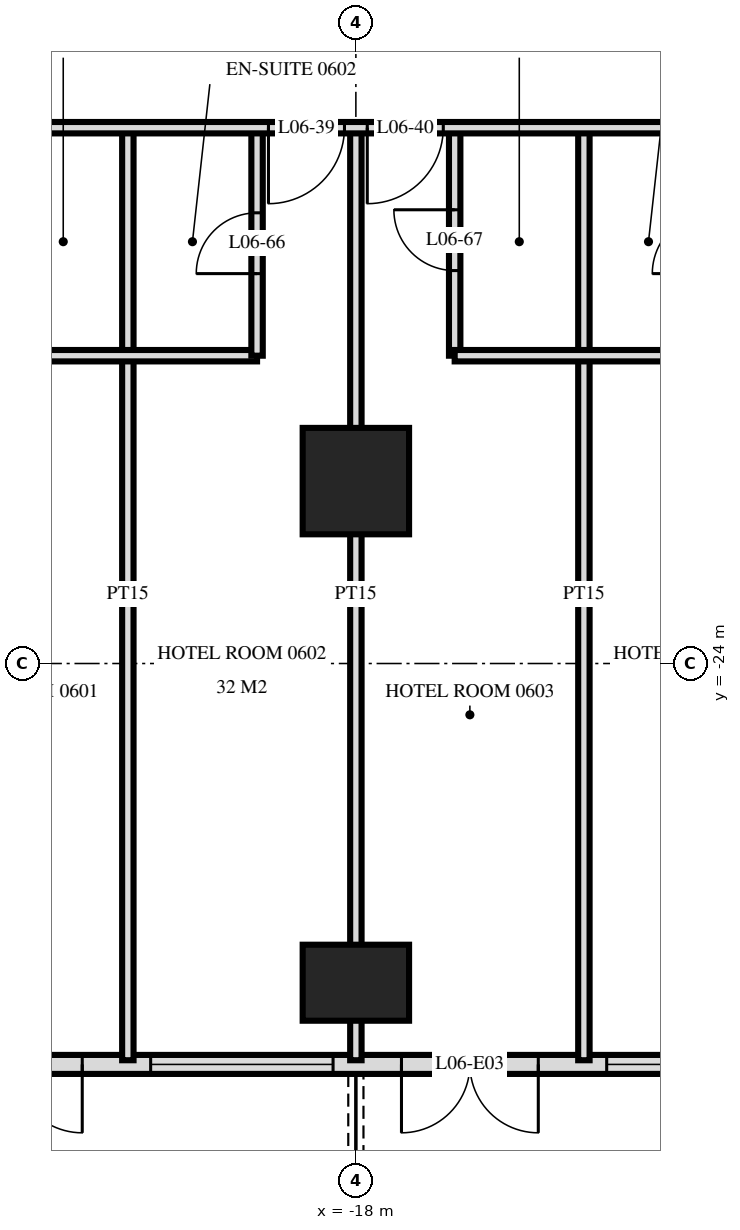
"""IFC4 building model, lengths in metres.
Left out: names, types, materials, properties, quantities, classifications, styles, units other than length and angle.
Written with IfcOpenShell. Run it as: python <this file> out.ifc"""

import sys

from ifc_helpers import new_model, si_unit, direction, frame, frame_2d, origin, origin_2d, place, context, subcontext, project, spatial, rectangle, extrude, element, fill, save


model = new_model("IFC4")
c1 = context("Model", 3, precision=1e-05, world=origin(), true_north=direction((0.0, 1.0)))
c2 = subcontext(c1, "Body", "Model", "MODEL_VIEW")
j1 = project(units=[si_unit("LENGTHUNIT", "METRE"), si_unit("PLANEANGLEUNIT", "RADIAN")], contexts=[c1])
p1 = place(None, origin())
s1 = spatial("IfcSite", under=j1, at=p1, CompositionType="ELEMENT")
p2 = place(p1, origin())
s2 = spatial("IfcBuilding", under=s1, at=p2, CompositionType="ELEMENT")
p3 = place(p2, frame((0.0, 0.0, 31.2)))
s3 = spatial("IfcBuildingStorey", under=s2, at=p3, CompositionType="ELEMENT", Elevation=31.2)
p4 = place(p3, frame((-18.0, -28.2, 0.0), z_axis=(0.0, 0.0, 1.0), x_axis=(1.0, 0.0, 0.0)))
e1 = element("IfcColumn", 1, at=p4, inside=s3, PredefinedType="COLUMN", context=c2, shape_type="SweptSolid", body=[
    extrude(rectangle(XDim=1.4, YDim=1.0, at=origin_2d()), origin(), (0.0, 0.0, 1.0), 3.6),
])
p5 = place(p3, frame((-18.0, -21.6, 0.0), z_axis=(0.0, 0.0, 1.0), x_axis=(1.0, 0.0, 0.0)))
e2 = element("IfcColumn", 2, at=p5, inside=s3, PredefinedType="COLUMN", context=c2, shape_type="SweptSolid", body=[
    extrude(rectangle(XDim=1.4, YDim=1.4, at=origin_2d()), origin(), (0.0, 0.0, 1.0), 3.6),
])
p6 = place(p3, frame((-28.775, -29.275, 0.0), z_axis=(0.0, 0.0, 1.0), x_axis=(1.0, 0.0, 0.0)))
e3 = element("IfcWall", 3, at=p6, inside=s3, PredefinedType="SOLIDWALL", context=c2, shape_type="SweptSolid", body=[
    extrude(rectangle(XDim=57.551, YDim=0.25, at=frame_2d((28.775, 0.0))), origin(), (0.0, 0.0, 1.0), 3.32),
])
p7 = place(p6, frame((0.575, 0.0, 0.0)))
e4 = element("IfcOpeningElement", 4, at=p7, cuts=e3, PredefinedType="OPENING", context=c2, shape_type="SweptSolid", body=[
    extrude(rectangle(XDim=1.8, YDim=2.4, at=frame_2d((0.9, 1.2))), frame((0.0, 0.135, 0.0), z_axis=(0.0, -1.0, 0.0), x_axis=(1.0, 0.0, 0.0)), (0.0, 0.0, 1.0), 0.27),
])
p8 = place(p6, frame((5.375, 0.0, 0.0)))
e5 = element("IfcOpeningElement", 5, at=p8, cuts=e3, PredefinedType="OPENING", context=c2, shape_type="SweptSolid", body=[
    extrude(rectangle(XDim=1.8, YDim=2.4, at=frame_2d((0.9, 1.2))), frame((0.0, 0.135, 0.0), z_axis=(0.0, -1.0, 0.0), x_axis=(1.0, 0.0, 0.0)), (0.0, 0.0, 1.0), 0.27),
])
p9 = place(p6, frame((8.075, 0.0, 0.3)))
e6 = element("IfcOpeningElement", 6, at=p9, cuts=e3, PredefinedType="OPENING", context=c2, shape_type="SweptSolid", body=[
    extrude(rectangle(XDim=2.4, YDim=2.1, at=frame_2d((1.2, 1.05))), frame((0.0, 0.135, 0.0), z_axis=(0.0, -1.0, 0.0), x_axis=(1.0, 0.0, 0.0)), (0.0, 0.0, 1.0), 0.27),
])
p10 = place(p6, frame((11.375, 0.0, 0.0)))
e7 = element("IfcOpeningElement", 7, at=p10, cuts=e3, PredefinedType="OPENING", context=c2, shape_type="SweptSolid", body=[
    extrude(rectangle(XDim=1.8, YDim=2.4, at=frame_2d((0.9, 1.2))), frame((0.0, 0.135, 0.0), z_axis=(0.0, -1.0, 0.0), x_axis=(1.0, 0.0, 0.0)), (0.0, 0.0, 1.0), 0.27),
])
p11 = place(p6, frame((14.075, 0.0, 0.3)))
e8 = element("IfcOpeningElement", 8, at=p11, cuts=e3, PredefinedType="OPENING", context=c2, shape_type="SweptSolid", body=[
    extrude(rectangle(XDim=2.4, YDim=2.1, at=frame_2d((1.2, 1.05))), frame((0.0, 0.135, 0.0), z_axis=(0.0, -1.0, 0.0), x_axis=(1.0, 0.0, 0.0)), (0.0, 0.0, 1.0), 0.27),
])
p12 = place(p6, frame((17.375, 0.0, 0.0)))
e9 = element("IfcOpeningElement", 9, at=p12, cuts=e3, PredefinedType="OPENING", context=c2, shape_type="SweptSolid", body=[
    extrude(rectangle(XDim=1.8, YDim=2.4, at=frame_2d((0.9, 1.2))), frame((0.0, 0.135, 0.0), z_axis=(0.0, -1.0, 0.0), x_axis=(1.0, 0.0, 0.0)), (0.0, 0.0, 1.0), 0.27),
])
p13 = place(p6, frame((20.075, 0.0, 0.3)))
e10 = element("IfcOpeningElement", 10, at=p13, cuts=e3, PredefinedType="OPENING", context=c2, shape_type="SweptSolid", body=[
    extrude(rectangle(XDim=2.4, YDim=2.1, at=frame_2d((1.2, 1.05))), frame((0.0, 0.135, 0.0), z_axis=(0.0, -1.0, 0.0), x_axis=(1.0, 0.0, 0.0)), (0.0, 0.0, 1.0), 0.27),
])
p14 = place(p6, frame((23.075, 0.0, 0.3)))
e11 = element("IfcOpeningElement", 11, at=p14, cuts=e3, PredefinedType="OPENING", context=c2, shape_type="SweptSolid", body=[
    extrude(rectangle(XDim=2.4, YDim=2.1, at=frame_2d((1.2, 1.05))), frame((0.0, 0.135, 0.0), z_axis=(0.0, -1.0, 0.0), x_axis=(1.0, 0.0, 0.0)), (0.0, 0.0, 1.0), 0.27),
])
p15 = place(p6, frame((26.375, 0.0, 0.0)))
e12 = element("IfcOpeningElement", 12, at=p15, cuts=e3, PredefinedType="OPENING", context=c2, shape_type="SweptSolid", body=[
    extrude(rectangle(XDim=1.8, YDim=2.4, at=frame_2d((0.9, 1.2))), frame((0.0, 0.135, 0.0), z_axis=(0.0, -1.0, 0.0), x_axis=(1.0, 0.0, 0.0)), (0.0, 0.0, 1.0), 0.27),
])
p16 = place(p6, frame((29.375, 0.0, 0.0)))
e13 = element("IfcOpeningElement", 13, at=p16, cuts=e3, PredefinedType="OPENING", context=c2, shape_type="SweptSolid", body=[
    extrude(rectangle(XDim=1.8, YDim=2.4, at=frame_2d((0.9, 1.2))), frame((0.0, 0.135, 0.0), z_axis=(0.0, -1.0, 0.0), x_axis=(1.0, 0.0, 0.0)), (0.0, 0.0, 1.0), 0.27),
])
p17 = place(p6, frame((32.075, 0.0, 0.3)))
e14 = element("IfcOpeningElement", 14, at=p17, cuts=e3, PredefinedType="OPENING", context=c2, shape_type="SweptSolid", body=[
    extrude(rectangle(XDim=2.4, YDim=2.1, at=frame_2d((1.2, 1.05))), frame((0.0, 0.135, 0.0), z_axis=(0.0, -1.0, 0.0), x_axis=(1.0, 0.0, 0.0)), (0.0, 0.0, 1.0), 0.27),
])
p18 = place(p6, frame((35.375, 0.0, 0.0)))
e15 = element("IfcOpeningElement", 15, at=p18, cuts=e3, PredefinedType="OPENING", context=c2, shape_type="SweptSolid", body=[
    extrude(rectangle(XDim=1.8, YDim=2.4, at=frame_2d((0.9, 1.2))), frame((0.0, 0.135, 0.0), z_axis=(0.0, -1.0, 0.0), x_axis=(1.0, 0.0, 0.0)), (0.0, 0.0, 1.0), 0.27),
])
p19 = place(p6, frame((38.075, 0.0, 0.3)))
e16 = element("IfcOpeningElement", 16, at=p19, cuts=e3, PredefinedType="OPENING", context=c2, shape_type="SweptSolid", body=[
    extrude(rectangle(XDim=2.4, YDim=2.1, at=frame_2d((1.2, 1.05))), frame((0.0, 0.135, 0.0), z_axis=(0.0, -1.0, 0.0), x_axis=(1.0, 0.0, 0.0)), (0.0, 0.0, 1.0), 0.27),
])
p20 = place(p6, frame((41.375, 0.0, 0.0)))
e17 = element("IfcOpeningElement", 17, at=p20, cuts=e3, PredefinedType="OPENING", context=c2, shape_type="SweptSolid", body=[
    extrude(rectangle(XDim=1.8, YDim=2.4, at=frame_2d((0.9, 1.2))), frame((0.0, 0.135, 0.0), z_axis=(0.0, -1.0, 0.0), x_axis=(1.0, 0.0, 0.0)), (0.0, 0.0, 1.0), 0.27),
])
p21 = place(p6, frame((44.075, 0.0, 0.3)))
e18 = element("IfcOpeningElement", 18, at=p21, cuts=e3, PredefinedType="OPENING", context=c2, shape_type="SweptSolid", body=[
    extrude(rectangle(XDim=2.4, YDim=2.1, at=frame_2d((1.2, 1.05))), frame((0.0, 0.135, 0.0), z_axis=(0.0, -1.0, 0.0), x_axis=(1.0, 0.0, 0.0)), (0.0, 0.0, 1.0), 0.27),
])
p22 = place(p6, frame((47.075, 0.0, 0.3)))
e19 = element("IfcOpeningElement", 19, at=p22, cuts=e3, PredefinedType="OPENING", context=c2, shape_type="SweptSolid", body=[
    extrude(rectangle(XDim=2.4, YDim=2.1, at=frame_2d((1.2, 1.05))), frame((0.0, 0.135, 0.0), z_axis=(0.0, -1.0, 0.0), x_axis=(1.0, 0.0, 0.0)), (0.0, 0.0, 1.0), 0.27),
])
p23 = place(p6, frame((50.375, 0.0, 0.0)))
e20 = element("IfcOpeningElement", 20, at=p23, cuts=e3, PredefinedType="OPENING", context=c2, shape_type="SweptSolid", body=[
    extrude(rectangle(XDim=1.8, YDim=2.4, at=frame_2d((0.9, 1.2))), frame((0.0, 0.135, 0.0), z_axis=(0.0, -1.0, 0.0), x_axis=(1.0, 0.0, 0.0)), (0.0, 0.0, 1.0), 0.27),
])
p24 = place(p6, frame((53.375, 0.0, 0.0)))
e21 = element("IfcOpeningElement", 21, at=p24, cuts=e3, PredefinedType="OPENING", context=c2, shape_type="SweptSolid", body=[
    extrude(rectangle(XDim=1.8, YDim=2.4, at=frame_2d((0.9, 1.2))), frame((0.0, 0.135, 0.0), z_axis=(0.0, -1.0, 0.0), x_axis=(1.0, 0.0, 0.0)), (0.0, 0.0, 1.0), 0.27),
])
p25 = place(p3, frame((-15.0, -29.22, 0.0), z_axis=(0.0, 0.0, 1.0), x_axis=(0.0, 1.0, 0.0)))
e22 = element("IfcWall", 22, at=p25, inside=s3, PredefinedType="PARTITIONING", context=c2, shape_type="SweptSolid", body=[
    extrude(rectangle(XDim=12.27, YDim=0.15, at=frame_2d((6.135, 0.0))), origin(), (0.0, 0.0, 1.0), 3.32),
])
p26 = place(p3, frame((-16.7, -19.95, 0.0), z_axis=(0.0, 0.0, 1.0), x_axis=(0.0, 1.0, 0.0)))
e23 = element("IfcWall", 23, at=p26, inside=s3, PredefinedType="PARTITIONING", context=c2, shape_type="SweptSolid", body=[
    extrude(rectangle(XDim=3.0, YDim=0.15, at=frame_2d((1.5, 0.0))), origin(), (0.0, 0.0, 1.0), 3.32),
])
p27 = place(p26, frame((1.12, 0.0, 0.0)))
e24 = element("IfcOpeningElement", 24, at=p27, cuts=e23, PredefinedType="OPENING", context=c2, shape_type="SweptSolid", body=[
    extrude(rectangle(XDim=0.8, YDim=2.1, at=frame_2d((0.4, 1.05))), frame((0.0, 0.085, 0.0), z_axis=(0.0, -1.0, 0.0), x_axis=(1.0, 0.0, 0.0)), (0.0, 0.0, 1.0), 0.17),
])
p28 = place(p3, frame((-18.0, -29.22, 0.0), z_axis=(0.0, 0.0, 1.0), x_axis=(0.0, 1.0, 0.0)))
e25 = element("IfcWall", 25, at=p28, inside=s3, PredefinedType="PARTITIONING", context=c2, shape_type="SweptSolid", body=[
    extrude(rectangle(XDim=12.27, YDim=0.15, at=frame_2d((6.135, 0.0))), origin(), (0.0, 0.0, 1.0), 3.32),
])
p29 = place(p3, frame((-19.3, -19.95, 0.0), z_axis=(0.0, 0.0, 1.0), x_axis=(0.0, 1.0, 0.0)))
e26 = element("IfcWall", 26, at=p29, inside=s3, PredefinedType="PARTITIONING", context=c2, shape_type="SweptSolid", body=[
    extrude(rectangle(XDim=3.0, YDim=0.15, at=frame_2d((1.5, 0.0))), origin(), (0.0, 0.0, 1.0), 3.32),
])
p30 = place(p29, frame((1.08, 0.0, 0.0)))
e27 = element("IfcOpeningElement", 27, at=p30, cuts=e26, PredefinedType="OPENING", context=c2, shape_type="SweptSolid", body=[
    extrude(rectangle(XDim=0.8, YDim=2.1, at=frame_2d((0.4, 1.05))), frame((0.0, 0.085, 0.0), z_axis=(0.0, -1.0, 0.0), x_axis=(1.0, 0.0, 0.0)), (0.0, 0.0, 1.0), 0.17),
])
p31 = place(p3, frame((-21.0, -29.22, 0.0), z_axis=(0.0, 0.0, 1.0), x_axis=(0.0, 1.0, 0.0)))
e28 = element("IfcWall", 28, at=p31, inside=s3, PredefinedType="PARTITIONING", context=c2, shape_type="SweptSolid", body=[
    extrude(rectangle(XDim=12.27, YDim=0.15, at=frame_2d((6.135, 0.0))), origin(), (0.0, 0.0, 1.0), 3.32),
])
for number, where, z_axis, x_axis in (
    (29, (-22.7, -19.95, 0.0), (0.0, 0.0, 1.0), (1.0, 0.0, 0.0)),
    (30, (-16.7, -19.95, 0.0), (0.0, 0.0, 1.0), (1.0, 0.0, 0.0)),
):
    element("IfcWall", number, at=place(p3, frame(where, z_axis=z_axis, x_axis=x_axis)), inside=s3, PredefinedType="PARTITIONING", context=c2, shape_type="SweptSolid", body=[
        extrude(rectangle(XDim=3.4, YDim=0.15, at=frame_2d((1.7, 0.0))), origin(), (0.0, 0.0, 1.0), 3.32),
    ])
p32 = place(p3, frame((-33.12, -16.95, 0.0), z_axis=(0.0, 0.0, 1.0), x_axis=(1.0, 0.0, 0.0)))
e31 = element("IfcWall", 31, at=p32, inside=s3, PredefinedType="PARTITIONING", context=c2, shape_type="SweptSolid", body=[
    extrude(rectangle(XDim=66.24, YDim=0.15, at=frame_2d((33.12, 0.0))), origin(), (0.0, 0.0, 1.0), 3.32),
])
p33 = place(p32, frame((9.27, 0.0, 0.0)))
e32 = element("IfcOpeningElement", 32, at=p33, cuts=e31, PredefinedType="OPENING", context=c2, shape_type="SweptSolid", body=[
    extrude(rectangle(XDim=1.0, YDim=2.1, at=frame_2d((0.5, 1.05))), frame((0.0, 0.085, 0.0), z_axis=(0.0, -1.0, 0.0), x_axis=(1.0, 0.0, 0.0)), (0.0, 0.0, 1.0), 0.17),
])
p34 = place(p32, frame((13.97, 0.0, 0.0)))
e33 = element("IfcOpeningElement", 33, at=p34, cuts=e31, PredefinedType="OPENING", context=c2, shape_type="SweptSolid", body=[
    extrude(rectangle(XDim=1.0, YDim=2.1, at=frame_2d((0.5, 1.05))), frame((0.0, 0.085, 0.0), z_axis=(0.0, -1.0, 0.0), x_axis=(1.0, 0.0, 0.0)), (0.0, 0.0, 1.0), 0.17),
])
p35 = place(p32, frame((15.27, 0.0, 0.0)))
e34 = element("IfcOpeningElement", 34, at=p35, cuts=e31, PredefinedType="OPENING", context=c2, shape_type="SweptSolid", body=[
    extrude(rectangle(XDim=1.0, YDim=2.1, at=frame_2d((0.5, 1.05))), frame((0.0, 0.085, 0.0), z_axis=(0.0, -1.0, 0.0), x_axis=(1.0, 0.0, 0.0)), (0.0, 0.0, 1.0), 0.17),
])
p36 = place(p32, frame((19.97, 0.0, 0.0)))
e35 = element("IfcOpeningElement", 35, at=p36, cuts=e31, PredefinedType="OPENING", context=c2, shape_type="SweptSolid", body=[
    extrude(rectangle(XDim=1.0, YDim=2.1, at=frame_2d((0.5, 1.05))), frame((0.0, 0.085, 0.0), z_axis=(0.0, -1.0, 0.0), x_axis=(1.0, 0.0, 0.0)), (0.0, 0.0, 1.0), 0.17),
])
p37 = place(p32, frame((22.27, 0.0, 0.0)))
e36 = element("IfcOpeningElement", 36, at=p37, cuts=e31, PredefinedType="OPENING", context=c2, shape_type="SweptSolid", body=[
    extrude(rectangle(XDim=1.0, YDim=2.1, at=frame_2d((0.5, 1.05))), frame((0.0, 0.085, 0.0), z_axis=(0.0, -1.0, 0.0), x_axis=(1.0, 0.0, 0.0)), (0.0, 0.0, 1.0), 0.17),
])
p38 = place(p32, frame((28.97, 0.0, 0.0)))
e37 = element("IfcOpeningElement", 37, at=p38, cuts=e31, PredefinedType="OPENING", context=c2, shape_type="SweptSolid", body=[
    extrude(rectangle(XDim=1.0, YDim=2.1, at=frame_2d((0.5, 1.05))), frame((0.0, 0.085, 0.0), z_axis=(0.0, -1.0, 0.0), x_axis=(1.0, 0.0, 0.0)), (0.0, 0.0, 1.0), 0.17),
])
p39 = place(p32, frame((30.27, 0.0, 0.0)))
e38 = element("IfcOpeningElement", 38, at=p39, cuts=e31, PredefinedType="OPENING", context=c2, shape_type="SweptSolid", body=[
    extrude(rectangle(XDim=1.0, YDim=2.1, at=frame_2d((0.5, 1.05))), frame((0.0, 0.085, 0.0), z_axis=(0.0, -1.0, 0.0), x_axis=(1.0, 0.0, 0.0)), (0.0, 0.0, 1.0), 0.17),
])
p40 = place(p32, frame((34.97, 0.0, 0.0)))
e39 = element("IfcOpeningElement", 39, at=p40, cuts=e31, PredefinedType="OPENING", context=c2, shape_type="SweptSolid", body=[
    extrude(rectangle(XDim=1.0, YDim=2.1, at=frame_2d((0.5, 1.05))), frame((0.0, 0.085, 0.0), z_axis=(0.0, -1.0, 0.0), x_axis=(1.0, 0.0, 0.0)), (0.0, 0.0, 1.0), 0.17),
])
p41 = place(p32, frame((36.27, 0.0, 0.0)))
e40 = element("IfcOpeningElement", 40, at=p41, cuts=e31, PredefinedType="OPENING", context=c2, shape_type="SweptSolid", body=[
    extrude(rectangle(XDim=1.0, YDim=2.1, at=frame_2d((0.5, 1.05))), frame((0.0, 0.085, 0.0), z_axis=(0.0, -1.0, 0.0), x_axis=(1.0, 0.0, 0.0)), (0.0, 0.0, 1.0), 0.17),
])
p42 = place(p32, frame((40.97, 0.0, 0.0)))
e41 = element("IfcOpeningElement", 41, at=p42, cuts=e31, PredefinedType="OPENING", context=c2, shape_type="SweptSolid", body=[
    extrude(rectangle(XDim=1.0, YDim=2.1, at=frame_2d((0.5, 1.05))), frame((0.0, 0.085, 0.0), z_axis=(0.0, -1.0, 0.0), x_axis=(1.0, 0.0, 0.0)), (0.0, 0.0, 1.0), 0.17),
])
p43 = place(p32, frame((42.27, 0.0, 0.0)))
e42 = element("IfcOpeningElement", 42, at=p43, cuts=e31, PredefinedType="OPENING", context=c2, shape_type="SweptSolid", body=[
    extrude(rectangle(XDim=1.0, YDim=2.1, at=frame_2d((0.5, 1.05))), frame((0.0, 0.085, 0.0), z_axis=(0.0, -1.0, 0.0), x_axis=(1.0, 0.0, 0.0)), (0.0, 0.0, 1.0), 0.17),
])
p44 = place(p32, frame((46.97, 0.0, 0.0)))
e43 = element("IfcOpeningElement", 43, at=p44, cuts=e31, PredefinedType="OPENING", context=c2, shape_type="SweptSolid", body=[
    extrude(rectangle(XDim=1.0, YDim=2.1, at=frame_2d((0.5, 1.05))), frame((0.0, 0.085, 0.0), z_axis=(0.0, -1.0, 0.0), x_axis=(1.0, 0.0, 0.0)), (0.0, 0.0, 1.0), 0.17),
])
p45 = place(p32, frame((48.27, 0.0, 0.0)))
e44 = element("IfcOpeningElement", 44, at=p45, cuts=e31, PredefinedType="OPENING", context=c2, shape_type="SweptSolid", body=[
    extrude(rectangle(XDim=1.0, YDim=2.1, at=frame_2d((0.5, 1.05))), frame((0.0, 0.085, 0.0), z_axis=(0.0, -1.0, 0.0), x_axis=(1.0, 0.0, 0.0)), (0.0, 0.0, 1.0), 0.17),
])
p46 = place(p32, frame((52.97, 0.0, 0.0)))
e45 = element("IfcOpeningElement", 45, at=p46, cuts=e31, PredefinedType="OPENING", context=c2, shape_type="SweptSolid", body=[
    extrude(rectangle(XDim=1.0, YDim=2.1, at=frame_2d((0.5, 1.05))), frame((0.0, 0.085, 0.0), z_axis=(0.0, -1.0, 0.0), x_axis=(1.0, 0.0, 0.0)), (0.0, 0.0, 1.0), 0.17),
])
p47 = place(p32, frame((54.27, 0.0, 0.0)))
e46 = element("IfcOpeningElement", 46, at=p47, cuts=e31, PredefinedType="OPENING", context=c2, shape_type="SweptSolid", body=[
    extrude(rectangle(XDim=1.0, YDim=2.1, at=frame_2d((0.5, 1.05))), frame((0.0, 0.085, 0.0), z_axis=(0.0, -1.0, 0.0), x_axis=(1.0, 0.0, 0.0)), (0.0, 0.0, 1.0), 0.17),
])
p48 = place(p32, frame((4.4, 0.0, 0.0)))
e47 = element("IfcOpeningElement", 47, at=p48, cuts=e31, PredefinedType="OPENING", context=c2, shape_type="SweptSolid", body=[
    extrude(rectangle(XDim=1.0, YDim=2.1, at=frame_2d((0.5, 1.05))), frame((0.0, 0.085, 0.0), z_axis=(0.0, -1.0, 0.0), x_axis=(1.0, 0.0, 0.0)), (0.0, 0.0, 1.0), 0.17),
])
p49 = place(p32, frame((60.8, 0.0, 0.0)))
e48 = element("IfcOpeningElement", 48, at=p49, cuts=e31, PredefinedType="OPENING", context=c2, shape_type="SweptSolid", body=[
    extrude(rectangle(XDim=1.0, YDim=2.1, at=frame_2d((0.5, 1.05))), frame((0.0, 0.085, 0.0), z_axis=(0.0, -1.0, 0.0), x_axis=(1.0, 0.0, 0.0)), (0.0, 0.0, 1.0), 0.17),
])
p50 = place(p8, frame((0.9, 0.0, 0.0), z_axis=(0.0, 0.0, 1.0), x_axis=(-1.0, 0.0, 0.0)))
e49 = element("IfcDoor", 49, at=p50, inside=s3, OperationType="DOUBLE_DOOR_SINGLE_SWING", PredefinedType="DOOR", context=c2, shape_type="SweptSolid", body=[
    extrude(rectangle(XDim=1.8, YDim=2.4, at=frame_2d((0.0, 1.2))), frame((0.0, -0.025, 0.0), z_axis=(0.0, 1.0, 0.0), x_axis=(-1.0, 0.0, 0.0)), (0.0, 0.0, 1.0), 0.05),
])
fill(e5, e49)
p51 = place(p9, origin())
e50 = element("IfcWindow", 50, at=p51, inside=s3, PartitioningType="SINGLE_PANEL", PredefinedType="WINDOW", context=c2, shape_type="SweptSolid", body=[
    extrude(rectangle(XDim=2.4, YDim=2.1, at=frame_2d((1.2, 1.05))), frame((0.0, 0.03, 0.0), z_axis=(0.0, -1.0, 0.0), x_axis=(1.0, 0.0, 0.0)), (0.0, 0.0, 1.0), 0.06),
])
fill(e6, e50)
p52 = place(p10, frame((0.9, 0.0, 0.0), z_axis=(0.0, 0.0, 1.0), x_axis=(-1.0, 0.0, 0.0)))
e51 = element("IfcDoor", 51, at=p52, inside=s3, OperationType="DOUBLE_DOOR_SINGLE_SWING", PredefinedType="DOOR", context=c2, shape_type="SweptSolid", body=[
    extrude(rectangle(XDim=1.8, YDim=2.4, at=frame_2d((0.0, 1.2))), frame((0.0, -0.025, 0.0), z_axis=(0.0, 1.0, 0.0), x_axis=(-1.0, 0.0, 0.0)), (0.0, 0.0, 1.0), 0.05),
])
fill(e7, e51)
p53 = place(p11, origin())
e52 = element("IfcWindow", 52, at=p53, inside=s3, PartitioningType="SINGLE_PANEL", PredefinedType="WINDOW", context=c2, shape_type="SweptSolid", body=[
    extrude(rectangle(XDim=2.4, YDim=2.1, at=frame_2d((1.2, 1.05))), frame((0.0, 0.03, 0.0), z_axis=(0.0, -1.0, 0.0), x_axis=(1.0, 0.0, 0.0)), (0.0, 0.0, 1.0), 0.06),
])
fill(e8, e52)
p54 = place(p34, frame((0.5, 0.0, 0.0), z_axis=(0.0, 0.0, 1.0), x_axis=(-1.0, 0.0, 0.0)))
e53 = element("IfcDoor", 53, at=p54, inside=s3, OperationType="SINGLE_SWING_LEFT", PredefinedType="DOOR", context=c2, shape_type="SweptSolid", body=[
    extrude(rectangle(XDim=1.0, YDim=2.1, at=frame_2d((0.0, 1.05))), frame((0.0, -0.025, 0.0), z_axis=(0.0, 1.0, 0.0), x_axis=(-1.0, 0.0, 0.0)), (0.0, 0.0, 1.0), 0.05),
])
fill(e33, e53)
p55 = place(p35, frame((0.5, 0.0, 0.0), z_axis=(0.0, 0.0, 1.0), x_axis=(-1.0, 0.0, 0.0)))
e54 = element("IfcDoor", 54, at=p55, inside=s3, OperationType="SINGLE_SWING_LEFT", PredefinedType="DOOR", context=c2, shape_type="SweptSolid", body=[
    extrude(rectangle(XDim=1.0, YDim=2.1, at=frame_2d((0.0, 1.05))), frame((0.0, -0.025, 0.0), z_axis=(0.0, 1.0, 0.0), x_axis=(-1.0, 0.0, 0.0)), (0.0, 0.0, 1.0), 0.05),
])
fill(e34, e54)
p56 = place(p30, origin())
e55 = element("IfcDoor", 55, at=p56, inside=s3, OperationType="SINGLE_SWING_RIGHT", PredefinedType="DOOR", context=c2, shape_type="SweptSolid", body=[
    extrude(rectangle(XDim=0.8, YDim=2.1, at=frame_2d((0.4, 1.05))), frame((0.0, 0.025, 0.0), z_axis=(0.0, -1.0, 0.0), x_axis=(1.0, 0.0, 0.0)), (0.0, 0.0, 1.0), 0.05),
])
fill(e27, e55)
p57 = place(p27, origin())
e56 = element("IfcDoor", 56, at=p57, inside=s3, OperationType="SINGLE_SWING_LEFT", PredefinedType="DOOR", context=c2, shape_type="SweptSolid", body=[
    extrude(rectangle(XDim=0.8, YDim=2.1, at=frame_2d((0.4, 1.05))), frame((0.0, 0.025, 0.0), z_axis=(0.0, -1.0, 0.0), x_axis=(1.0, 0.0, 0.0)), (0.0, 0.0, 1.0), 0.05),
])
fill(e24, e56)
save(model, sys.argv[1])
